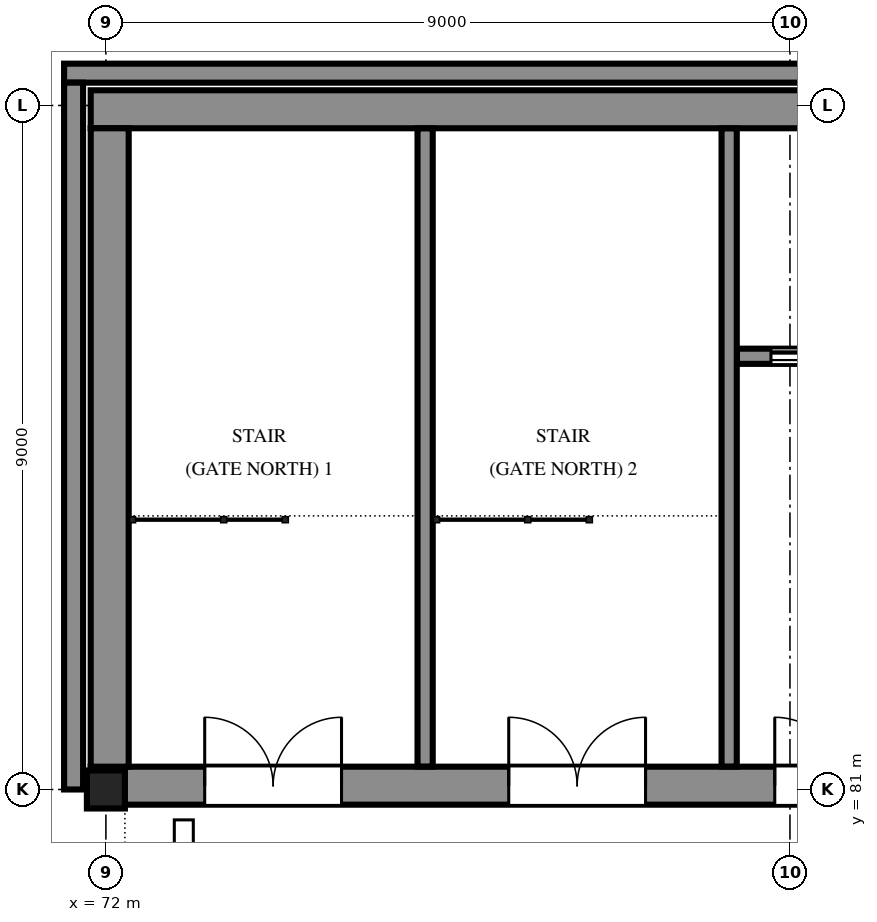
"""IFC4 building model, lengths in metres.
Left out: names, types, materials, properties, quantities, classifications, styles, units other than length and angle.
Written with IfcOpenShell. Run it as: python <this file> out.ifc"""

import sys

from ifc_helpers import new_model, si_unit, direction, frame, frame_2d, origin, origin_2d, place, context, subcontext, project, spatial, polyline, rectangle, hollow_rectangle, outline, extrude, element, fill, save


model = new_model("IFC4")
c1 = context("Model", 3, precision=1e-05, world=origin(), true_north=direction((0.0, 1.0)))
c2 = subcontext(c1, "Body", "Model", "MODEL_VIEW")
j1 = project(units=[si_unit("LENGTHUNIT", "METRE"), si_unit("PLANEANGLEUNIT", "RADIAN")], contexts=[c1])
p1 = place(None, origin())
s1 = spatial("IfcSite", under=j1, at=p1, CompositionType="ELEMENT")
p2 = place(p1, origin())
s2 = spatial("IfcBuilding", under=s1, at=p2, CompositionType="ELEMENT")
p3 = place(p2, frame((0.0, 0.0, 20.1)))
s3 = spatial("IfcBuildingStorey", under=s2, at=p3, CompositionType="ELEMENT", Elevation=20.1)
p4 = place(p3, frame((72.0, 81.0, 0.0), z_axis=(0.0, 0.0, 1.0), x_axis=(1.0, 0.0, 0.0)))
e1 = element("IfcColumn", 1, at=p4, inside=s3, PredefinedType="COLUMN", context=c2, shape_type="SweptSolid", body=[
    extrude(hollow_rectangle(XDim=0.5, YDim=0.5, WallThickness=0.032, at=origin_2d()), origin(), (0.0, 0.0, 1.0), 4.2),
])
p5 = place(p3, frame((71.8, 81.05, 0.0), z_axis=(0.0, 0.0, 1.0), x_axis=(1.0, 0.0, 0.0)))
e2 = element("IfcWall", 2, at=p5, inside=s3, PredefinedType="SOLIDWALL", context=c2, shape_type="SweptSolid", body=[
    extrude(rectangle(XDim=18.4, YDim=0.5, at=frame_2d((9.2, 0.0))), origin(), (0.0, 0.0, 1.0), 4.2),
])
p6 = place(p5, frame((1.5, 0.0, 0.0)))
e3 = element("IfcOpeningElement", 3, at=p6, cuts=e2, PredefinedType="OPENING", context=c2, shape_type="SweptSolid", body=[
    extrude(rectangle(XDim=1.8, YDim=2.1, at=frame_2d((0.9, 1.05))), frame((0.0, 0.26, 0.0), z_axis=(0.0, -1.0, 0.0), x_axis=(1.0, 0.0, 0.0)), (0.0, 0.0, 1.0), 0.52),
])
p7 = place(p5, frame((5.5, 0.0, 0.0)))
e4 = element("IfcOpeningElement", 4, at=p7, cuts=e2, PredefinedType="OPENING", context=c2, shape_type="SweptSolid", body=[
    extrude(rectangle(XDim=1.8, YDim=2.1, at=frame_2d((0.9, 1.05))), frame((0.0, 0.26, 0.0), z_axis=(0.0, -1.0, 0.0), x_axis=(1.0, 0.0, 0.0)), (0.0, 0.0, 1.0), 0.52),
])
p8 = place(p5, frame((9.0, 0.0, 0.0)))
e5 = element("IfcOpeningElement", 5, at=p8, cuts=e2, PredefinedType="OPENING", context=c2, shape_type="SweptSolid", body=[
    extrude(rectangle(XDim=1.8, YDim=2.1, at=frame_2d((0.9, 1.05))), frame((0.0, 0.26, 0.0), z_axis=(0.0, -1.0, 0.0), x_axis=(1.0, 0.0, 0.0)), (0.0, 0.0, 1.0), 0.52),
])
p9 = place(p5, frame((16.15, 0.0, 0.0)))
e6 = element("IfcOpeningElement", 6, at=p9, cuts=e2, PredefinedType="OPENING", context=c2, shape_type="SweptSolid", body=[
    extrude(rectangle(XDim=0.9, YDim=2.1, at=frame_2d((0.45, 1.05))), frame((0.0, 0.26, 0.0), z_axis=(0.0, -1.0, 0.0), x_axis=(1.0, 0.0, 0.0)), (0.0, 0.0, 1.0), 0.52),
])
p10 = place(p3, frame((71.8, 89.95, 0.0), z_axis=(0.0, 0.0, 1.0), x_axis=(1.0, 0.0, 0.0)))
e7 = element("IfcWall", 7, at=p10, inside=s3, PredefinedType="SOLIDWALL", context=c2, shape_type="SweptSolid", body=[
    extrude(rectangle(XDim=18.4, YDim=0.5, at=frame_2d((9.2, 0.0))), origin(), (0.0, 0.0, 1.0), 4.2),
])
p11 = place(p3, frame((72.05, 81.3, 0.0), z_axis=(0.0, 0.0, 1.0), x_axis=(0.0, 1.0, 0.0)))
e8 = element("IfcWall", 8, at=p11, inside=s3, PredefinedType="SOLIDWALL", context=c2, shape_type="SweptSolid", body=[
    extrude(rectangle(XDim=8.4, YDim=0.5, at=frame_2d((4.2, 0.0))), origin(), (0.0, 0.0, 1.0), 4.2),
])
for number, where, z_axis, x_axis in (
    (9, (76.2, 81.302, -0.15), (0.0, 0.0, 1.0), (0.0, 1.0, 0.0)),
    (10, (80.2, 81.302, -0.15), (0.0, 0.0, 1.0), (0.0, 1.0, 0.0)),
):
    element("IfcWall", number, at=place(p3, frame(where, z_axis=z_axis, x_axis=x_axis)), inside=s3, PredefinedType="SOLIDWALL", context=c2, shape_type="SweptSolid", body=[
        extrude(rectangle(XDim=8.396, YDim=0.2, at=frame_2d((4.198, 0.0))), origin(), (0.0, 0.0, 1.0), 3.666),
    ])
p12 = place(p3, frame((80.302, 86.7, 0.0), z_axis=(0.0, 0.0, 1.0), x_axis=(1.0, 0.0, 0.0)))
e11 = element("IfcWall", 11, at=p12, inside=s3, PredefinedType="SOLIDWALL", context=c2, shape_type="SweptSolid", body=[
    extrude(rectangle(XDim=2.198, YDim=0.2, at=frame_2d((1.099, 0.0))), origin(), (0.0, 0.0, 1.0), 3.516),
])
p13 = place(p12, frame((0.448, 0.0, 0.0)))
e12 = element("IfcOpeningElement", 12, at=p13, cuts=e11, PredefinedType="OPENING", context=c2, shape_type="SweptSolid", body=[
    extrude(rectangle(XDim=1.1, YDim=2.1, at=frame_2d((0.55, 1.05))), frame((0.0, 0.11, 0.0), z_axis=(0.0, -1.0, 0.0), x_axis=(1.0, 0.0, 0.0)), (0.0, 0.0, 1.0), 0.22),
])
p14 = place(p13, origin())
e13 = element("IfcDoor", 13, at=p14, inside=s3, OperationType="SLIDING_TO_LEFT", PredefinedType="DOOR", context=c2, shape_type="SweptSolid", body=[
    extrude(outline(polyline([(0.0, 0.0), (0.07, 0.0), (0.07, 2.03), (1.03, 2.03), (1.03, 0.0), (1.1, 0.0), (1.1, 2.1), (0.0, 2.1), (0.0, 0.0)])), frame((0.0, 0.025, 0.0), z_axis=(0.0, -1.0, 0.0), x_axis=(1.0, 0.0, 0.0)), (0.0, 0.0, 1.0), 0.05),
    extrude(rectangle(XDim=0.524, YDim=2.016, at=frame_2d((0.336, 1.018))), frame((0.0, 0.018, 0.0), z_axis=(0.0, -1.0, 0.0), x_axis=(1.0, 0.0, 0.0)), (0.0, 0.0, 1.0), 0.016),
    extrude(rectangle(XDim=0.52, YDim=2.016, at=frame_2d((0.766, 1.018))), frame((0.0, -0.002, 0.0), z_axis=(0.0, -1.0, 0.0), x_axis=(1.0, 0.0, 0.0)), (0.0, 0.0, 1.0), 0.016),
])
fill(e12, e13)
p15 = place(p6, origin())
e14 = element("IfcDoor", 14, at=p15, inside=s3, OperationType="DOUBLE_DOOR_SINGLE_SWING", PredefinedType="DOOR", context=c2, shape_type="SweptSolid", body=[
    extrude(outline(polyline([(0.0, 0.0), (0.07, 0.0), (0.07, 2.03), (1.73, 2.03), (1.73, 0.0), (1.8, 0.0), (1.8, 2.1), (0.0, 2.1), (0.0, 0.0)])), frame((0.0, 0.025, 0.0), z_axis=(0.0, -1.0, 0.0), x_axis=(1.0, 0.0, 0.0)), (0.0, 0.0, 1.0), 0.05),
    extrude(outline(polyline([(0.074, 0.01), (0.897, 0.01), (0.897, 2.026), (0.074, 2.026), (0.074, 0.01)]), holes=[polyline([(0.194, 0.16), (0.777, 0.16), (0.777, 1.01), (0.194, 1.01), (0.194, 0.16)]), polyline([(0.335, 1.16), (0.635, 1.16), (0.635, 1.76), (0.335, 1.76), (0.335, 1.16)])]), frame((0.0, 0.017, 0.0), z_axis=(0.0, -1.0, 0.0), x_axis=(1.0, 0.0, 0.0)), (0.0, 0.0, 1.0), 0.035),
    extrude(rectangle(XDim=0.583, YDim=0.85, at=frame_2d((0.485, 0.585))), frame((0.0, 0.009, 0.0), z_axis=(0.0, -1.0, 0.0), x_axis=(1.0, 0.0, 0.0)), (0.0, 0.0, 1.0), 0.017),
    extrude(rectangle(XDim=0.3, YDim=0.6, at=frame_2d((0.485, 1.46))), frame((0.0, 0.006, 0.0), z_axis=(0.0, -1.0, 0.0), x_axis=(1.0, 0.0, 0.0)), (0.0, 0.0, 1.0), 0.012),
    extrude(outline(polyline([(0.903, 0.01), (1.726, 0.01), (1.726, 2.026), (0.903, 2.026), (0.903, 0.01)]), holes=[polyline([(1.023, 0.16), (1.606, 0.16), (1.606, 1.01), (1.023, 1.01), (1.023, 0.16)]), polyline([(1.165, 1.16), (1.465, 1.16), (1.465, 1.76), (1.165, 1.76), (1.165, 1.16)])]), frame((0.0, 0.017, 0.0), z_axis=(0.0, -1.0, 0.0), x_axis=(1.0, 0.0, 0.0)), (0.0, 0.0, 1.0), 0.035),
    extrude(rectangle(XDim=0.583, YDim=0.85, at=frame_2d((1.314, 0.585))), frame((0.0, 0.009, 0.0), z_axis=(0.0, -1.0, 0.0), x_axis=(1.0, 0.0, 0.0)), (0.0, 0.0, 1.0), 0.017),
    extrude(rectangle(XDim=0.3, YDim=0.6, at=frame_2d((1.314, 1.46))), frame((0.0, 0.006, 0.0), z_axis=(0.0, -1.0, 0.0), x_axis=(1.0, 0.0, 0.0)), (0.0, 0.0, 1.0), 0.012),
])
fill(e3, e14)
p16 = place(p7, origin())
e15 = element("IfcDoor", 15, at=p16, inside=s3, OperationType="DOUBLE_DOOR_SINGLE_SWING", PredefinedType="DOOR", context=c2, shape_type="SweptSolid", body=[
    extrude(outline(polyline([(0.0, 0.0), (0.07, 0.0), (0.07, 2.03), (1.73, 2.03), (1.73, 0.0), (1.8, 0.0), (1.8, 2.1), (0.0, 2.1), (0.0, 0.0)])), frame((0.0, 0.025, 0.0), z_axis=(0.0, -1.0, 0.0), x_axis=(1.0, 0.0, 0.0)), (0.0, 0.0, 1.0), 0.05),
    extrude(outline(polyline([(0.074, 0.01), (0.897, 0.01), (0.897, 2.026), (0.074, 2.026), (0.074, 0.01)]), holes=[polyline([(0.194, 0.16), (0.777, 0.16), (0.777, 1.01), (0.194, 1.01), (0.194, 0.16)]), polyline([(0.335, 1.16), (0.635, 1.16), (0.635, 1.76), (0.335, 1.76), (0.335, 1.16)])]), frame((0.0, 0.017, 0.0), z_axis=(0.0, -1.0, 0.0), x_axis=(1.0, 0.0, 0.0)), (0.0, 0.0, 1.0), 0.035),
    extrude(rectangle(XDim=0.583, YDim=0.85, at=frame_2d((0.485, 0.585))), frame((0.0, 0.009, 0.0), z_axis=(0.0, -1.0, 0.0), x_axis=(1.0, 0.0, 0.0)), (0.0, 0.0, 1.0), 0.017),
    extrude(rectangle(XDim=0.3, YDim=0.6, at=frame_2d((0.485, 1.46))), frame((0.0, 0.006, 0.0), z_axis=(0.0, -1.0, 0.0), x_axis=(1.0, 0.0, 0.0)), (0.0, 0.0, 1.0), 0.012),
    extrude(outline(polyline([(0.903, 0.01), (1.726, 0.01), (1.726, 2.026), (0.903, 2.026), (0.903, 0.01)]), holes=[polyline([(1.023, 0.16), (1.606, 0.16), (1.606, 1.01), (1.023, 1.01), (1.023, 0.16)]), polyline([(1.165, 1.16), (1.465, 1.16), (1.465, 1.76), (1.165, 1.76), (1.165, 1.16)])]), frame((0.0, 0.017, 0.0), z_axis=(0.0, -1.0, 0.0), x_axis=(1.0, 0.0, 0.0)), (0.0, 0.0, 1.0), 0.035),
    extrude(rectangle(XDim=0.583, YDim=0.85, at=frame_2d((1.314, 0.585))), frame((0.0, 0.009, 0.0), z_axis=(0.0, -1.0, 0.0), x_axis=(1.0, 0.0, 0.0)), (0.0, 0.0, 1.0), 0.017),
    extrude(rectangle(XDim=0.3, YDim=0.6, at=frame_2d((1.314, 1.46))), frame((0.0, 0.006, 0.0), z_axis=(0.0, -1.0, 0.0), x_axis=(1.0, 0.0, 0.0)), (0.0, 0.0, 1.0), 0.012),
])
fill(e4, e15)
p17 = place(p8, origin())
e16 = element("IfcDoor", 16, at=p17, inside=s3, OperationType="DOUBLE_DOOR_SINGLE_SWING", PredefinedType="DOOR", context=c2, shape_type="SweptSolid", body=[
    extrude(outline(polyline([(0.0, 0.0), (0.07, 0.0), (0.07, 2.03), (1.73, 2.03), (1.73, 0.0), (1.8, 0.0), (1.8, 2.1), (0.0, 2.1), (0.0, 0.0)])), frame((0.0, 0.025, 0.0), z_axis=(0.0, -1.0, 0.0), x_axis=(1.0, 0.0, 0.0)), (0.0, 0.0, 1.0), 0.05),
    extrude(outline(polyline([(0.074, 0.01), (0.897, 0.01), (0.897, 2.026), (0.074, 2.026), (0.074, 0.01)]), holes=[polyline([(0.194, 0.16), (0.777, 0.16), (0.777, 1.01), (0.194, 1.01), (0.194, 0.16)]), polyline([(0.335, 1.16), (0.635, 1.16), (0.635, 1.76), (0.335, 1.76), (0.335, 1.16)])]), frame((0.0, 0.017, 0.0), z_axis=(0.0, -1.0, 0.0), x_axis=(1.0, 0.0, 0.0)), (0.0, 0.0, 1.0), 0.035),
    extrude(rectangle(XDim=0.583, YDim=0.85, at=frame_2d((0.485, 0.585))), frame((0.0, 0.009, 0.0), z_axis=(0.0, -1.0, 0.0), x_axis=(1.0, 0.0, 0.0)), (0.0, 0.0, 1.0), 0.017),
    extrude(rectangle(XDim=0.3, YDim=0.6, at=frame_2d((0.485, 1.46))), frame((0.0, 0.006, 0.0), z_axis=(0.0, -1.0, 0.0), x_axis=(1.0, 0.0, 0.0)), (0.0, 0.0, 1.0), 0.012),
    extrude(outline(polyline([(0.903, 0.01), (1.726, 0.01), (1.726, 2.026), (0.903, 2.026), (0.903, 0.01)]), holes=[polyline([(1.023, 0.16), (1.606, 0.16), (1.606, 1.01), (1.023, 1.01), (1.023, 0.16)]), polyline([(1.165, 1.16), (1.465, 1.16), (1.465, 1.76), (1.165, 1.76), (1.165, 1.16)])]), frame((0.0, 0.017, 0.0), z_axis=(0.0, -1.0, 0.0), x_axis=(1.0, 0.0, 0.0)), (0.0, 0.0, 1.0), 0.035),
    extrude(rectangle(XDim=0.583, YDim=0.85, at=frame_2d((1.314, 0.585))), frame((0.0, 0.009, 0.0), z_axis=(0.0, -1.0, 0.0), x_axis=(1.0, 0.0, 0.0)), (0.0, 0.0, 1.0), 0.017),
    extrude(rectangle(XDim=0.3, YDim=0.6, at=frame_2d((1.314, 1.46))), frame((0.0, 0.006, 0.0), z_axis=(0.0, -1.0, 0.0), x_axis=(1.0, 0.0, 0.0)), (0.0, 0.0, 1.0), 0.012),
])
fill(e5, e16)
save(model, sys.argv[1])
